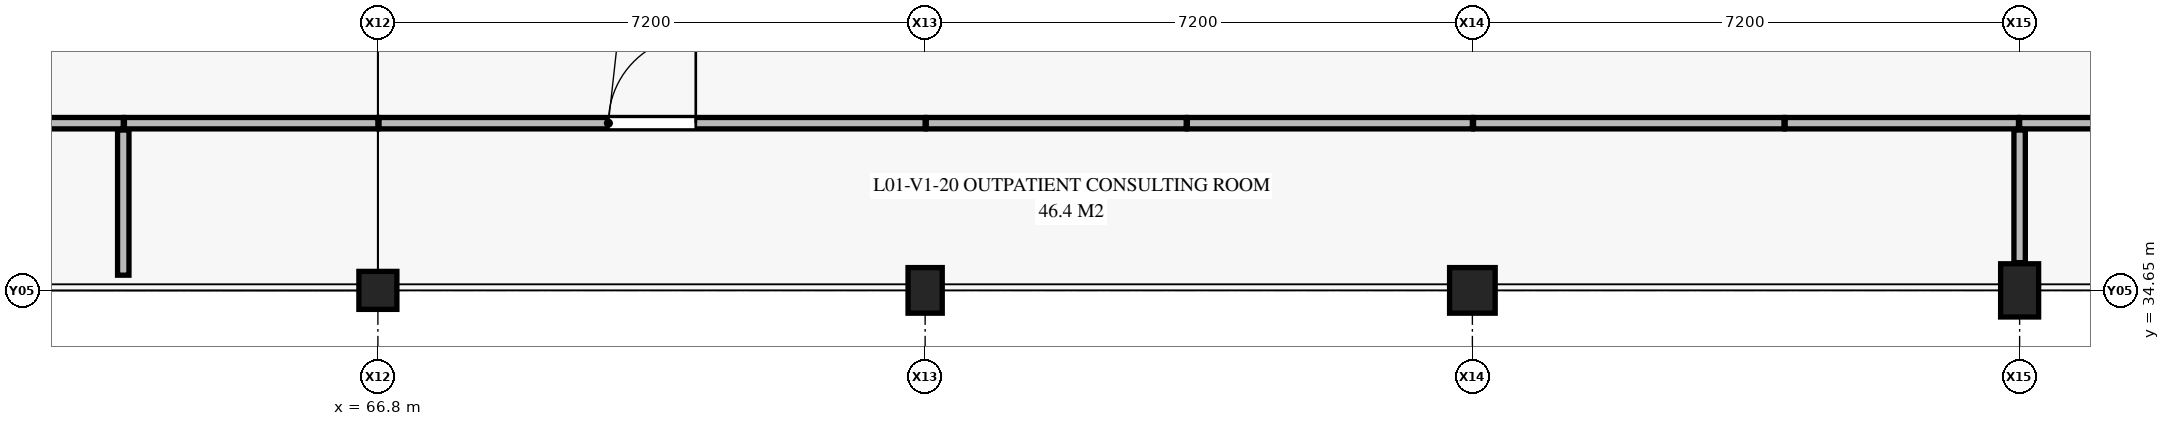
"""IFC4 building model, lengths in metres.
Left out: names, types, materials, properties, quantities, classifications, styles, units other than length and angle.
Written with IfcOpenShell. Run it as: python <this file> out.ifc"""

import sys

from ifc_helpers import new_model, si_unit, direction, frame, frame_2d, origin, origin_2d, place, context, subcontext, project, spatial, rectangle, extrude, element, fill, save


model = new_model("IFC4")
c1 = context("Model", 3, precision=1e-05, world=origin(), true_north=direction((0.0, 1.0)))
c2 = subcontext(c1, "Body", "Model", "MODEL_VIEW")
j1 = project(units=[si_unit("LENGTHUNIT", "METRE"), si_unit("PLANEANGLEUNIT", "RADIAN")], contexts=[c1])
p1 = place(None, origin())
s1 = spatial("IfcSite", under=j1, at=p1, CompositionType="ELEMENT")
p2 = place(p1, origin())
s2 = spatial("IfcBuilding", under=s1, at=p2, CompositionType="ELEMENT")
p3 = place(p2, frame((0.0, 0.0, 4.8)))
s3 = spatial("IfcBuildingStorey", under=s2, at=p3, CompositionType="ELEMENT", Elevation=4.8)
p4 = place(p3, frame((66.8, 34.65, 0.0), z_axis=(0.0, 0.0, 1.0), x_axis=(1.0, 0.0, 0.0)))
e1 = element("IfcColumn", 1, at=p4, inside=s3, PredefinedType="COLUMN", context=c2, shape_type="SweptSolid", body=[
    extrude(rectangle(XDim=0.5, YDim=0.5, at=origin_2d()), origin(), (0.0, 0.0, 1.0), 4.05),
])
p5 = place(p3, frame((74.0, 34.65, 0.0), z_axis=(0.0, 0.0, 1.0), x_axis=(1.0, 0.0, 0.0)))
e2 = element("IfcColumn", 2, at=p5, inside=s3, PredefinedType="COLUMN", context=c2, shape_type="SweptSolid", body=[
    extrude(rectangle(XDim=0.45, YDim=0.6, at=origin_2d()), origin(), (0.0, 0.0, 1.0), 4.05),
])
p6 = place(p3, frame((81.2, 34.65, 0.0), z_axis=(0.0, 0.0, 1.0), x_axis=(1.0, 0.0, 0.0)))
e3 = element("IfcColumn", 3, at=p6, inside=s3, PredefinedType="COLUMN", context=c2, shape_type="SweptSolid", body=[
    extrude(rectangle(XDim=0.6, YDim=0.6, at=origin_2d()), origin(), (0.0, 0.0, 1.0), 4.05),
])
p7 = place(p3, frame((88.4, 34.65, 0.0), z_axis=(0.0, 0.0, 1.0), x_axis=(1.0, 0.0, 0.0)))
e4 = element("IfcColumn", 4, at=p7, inside=s3, PredefinedType="COLUMN", context=c2, shape_type="SweptSolid", body=[
    extrude(rectangle(XDim=0.5, YDim=0.7, at=origin_2d()), origin(), (0.0, 0.0, 1.0), 4.05),
])
p8 = place(p3, frame((88.4, 36.85, 0.0), z_axis=(0.0, 0.0, 1.0), x_axis=(1.0, 0.0, 0.0)))
e5 = element("IfcWall", 5, at=p8, inside=s3, PredefinedType="PARTITIONING", context=c2, shape_type="SweptSolid", body=[
    extrude(rectangle(XDim=7.2, YDim=0.15, at=frame_2d((3.6, 0.0))), origin(), (0.0, 0.0, 1.0), 3.95),
])
p9 = place(p8, frame((2.8, 0.0, 0.0)))
e6 = element("IfcOpeningElement", 6, at=p9, cuts=e5, PredefinedType="OPENING", context=c2, shape_type="SweptSolid", body=[
    extrude(rectangle(XDim=1.6, YDim=2.25, at=frame_2d((0.8, 1.125))), frame((0.0, 0.085, 0.0), z_axis=(0.0, -1.0, 0.0), x_axis=(1.0, 0.0, 0.0)), (0.0, 0.0, 1.0), 0.17),
])
p10 = place(p3, frame((59.615, 36.85, 0.0), z_axis=(0.0, 0.0, 1.0), x_axis=(1.0, 0.0, 0.0)))
e7 = element("IfcWall", 7, at=p10, inside=s3, PredefinedType="PARTITIONING", context=c2, shape_type="SweptSolid", body=[
    extrude(rectangle(XDim=3.835, YDim=0.15, at=frame_2d((1.917, 0.0))), origin(), (0.0, 0.0, 1.0), 3.95),
])
p11 = place(p3, frame((77.45, 36.85, 0.0), z_axis=(0.0, 0.0, 1.0), x_axis=(1.0, 0.0, 0.0)))
e8 = element("IfcWall", 8, at=p11, inside=s3, PredefinedType="PARTITIONING", context=c2, shape_type="SweptSolid", body=[
    extrude(rectangle(XDim=3.75, YDim=0.15, at=frame_2d((1.875, 0.0))), origin(), (0.0, 0.0, 1.0), 3.95),
])
p12 = place(p3, frame((81.215, 36.85, 0.0), z_axis=(0.0, 0.0, 1.0), x_axis=(1.0, 0.0, 0.0)))
e9 = element("IfcWall", 9, at=p12, inside=s3, PredefinedType="PARTITIONING", context=c2, shape_type="SweptSolid", body=[
    extrude(rectangle(XDim=4.085, YDim=0.15, at=frame_2d((2.042, 0.0))), origin(), (0.0, 0.0, 1.0), 3.95),
])
p13 = place(p3, frame((85.315, 36.85, 0.0), z_axis=(0.0, 0.0, 1.0), x_axis=(1.0, 0.0, 0.0)))
e10 = element("IfcWall", 10, at=p13, inside=s3, PredefinedType="PARTITIONING", context=c2, shape_type="SweptSolid", body=[
    extrude(rectangle(XDim=3.07, YDim=0.15, at=frame_2d((1.535, 0.0))), origin(), (0.0, 0.0, 1.0), 3.95),
])
p14 = place(p3, frame((63.465, 36.85, 0.0), z_axis=(0.0, 0.0, 1.0), x_axis=(1.0, 0.0, 0.0)))
e11 = element("IfcWall", 11, at=p14, inside=s3, PredefinedType="PARTITIONING", context=c2, shape_type="SweptSolid", body=[
    extrude(rectangle(XDim=3.335, YDim=0.15, at=frame_2d((1.667, 0.0))), origin(), (0.0, 0.0, 1.0), 3.95),
])
p15 = place(p3, frame((66.815, 36.85, 0.0), z_axis=(0.0, 0.0, 1.0), x_axis=(1.0, 0.0, 0.0)))
e12 = element("IfcWall", 12, at=p15, inside=s3, PredefinedType="PARTITIONING", context=c2, shape_type="SweptSolid", body=[
    extrude(rectangle(XDim=7.185, YDim=0.15, at=frame_2d((3.593, 0.0))), origin(), (0.0, 0.0, 1.0), 3.95),
])
p16 = place(p15, frame((3.018, 0.0, 0.0)))
e13 = element("IfcOpeningElement", 13, at=p16, cuts=e12, PredefinedType="OPENING", context=c2, shape_type="SweptSolid", body=[
    extrude(rectangle(XDim=1.15, YDim=2.15, at=frame_2d((0.575, 1.075))), frame((0.0, 0.085, 0.0), z_axis=(0.0, -1.0, 0.0), x_axis=(1.0, 0.0, 0.0)), (0.0, 0.0, 1.0), 0.17),
])
p17 = place(p3, frame((74.015, 36.85, 0.0), z_axis=(0.0, 0.0, 1.0), x_axis=(1.0, 0.0, 0.0)))
e14 = element("IfcWall", 14, at=p17, inside=s3, PredefinedType="PARTITIONING", context=c2, shape_type="SweptSolid", body=[
    extrude(rectangle(XDim=3.42, YDim=0.15, at=frame_2d((1.71, 0.0))), origin(), (0.0, 0.0, 1.0), 3.95),
])
p18 = place(p3, frame((88.4, 35.015, 0.0), z_axis=(0.0, 0.0, 1.0), x_axis=(0.0, 1.0, 0.0)))
e15 = element("IfcWall", 15, at=p18, inside=s3, PredefinedType="PARTITIONING", context=c2, shape_type="SweptSolid", body=[
    extrude(rectangle(XDim=1.745, YDim=0.15, at=frame_2d((0.873, 0.0))), origin(), (0.0, 0.0, 1.0), 3.95),
])
p19 = place(p3, frame((63.45, 34.85, 0.0), z_axis=(0.0, 0.0, 1.0), x_axis=(0.0, 1.0, 0.0)))
e16 = element("IfcWall", 16, at=p19, inside=s3, PredefinedType="PARTITIONING", context=c2, shape_type="SweptSolid", body=[
    extrude(rectangle(XDim=1.91, YDim=0.15, at=frame_2d((0.955, 0.0))), origin(), (0.0, 0.0, 1.0), 3.95),
])
p20 = place(p16, origin())
e17 = element("IfcDoor", 17, at=p20, inside=s3, OperationType="SINGLE_SWING_RIGHT", PredefinedType="DOOR", context=c2, shape_type="SweptSolid", body=[
    extrude(rectangle(XDim=1.15, YDim=2.15, at=frame_2d((0.575, 1.075))), frame((0.0, 0.025, 0.0), z_axis=(0.0, -1.0, 0.0), x_axis=(1.0, 0.0, 0.0)), (0.0, 0.0, 1.0), 0.05),
])
fill(e13, e17)
save(model, sys.argv[1])
